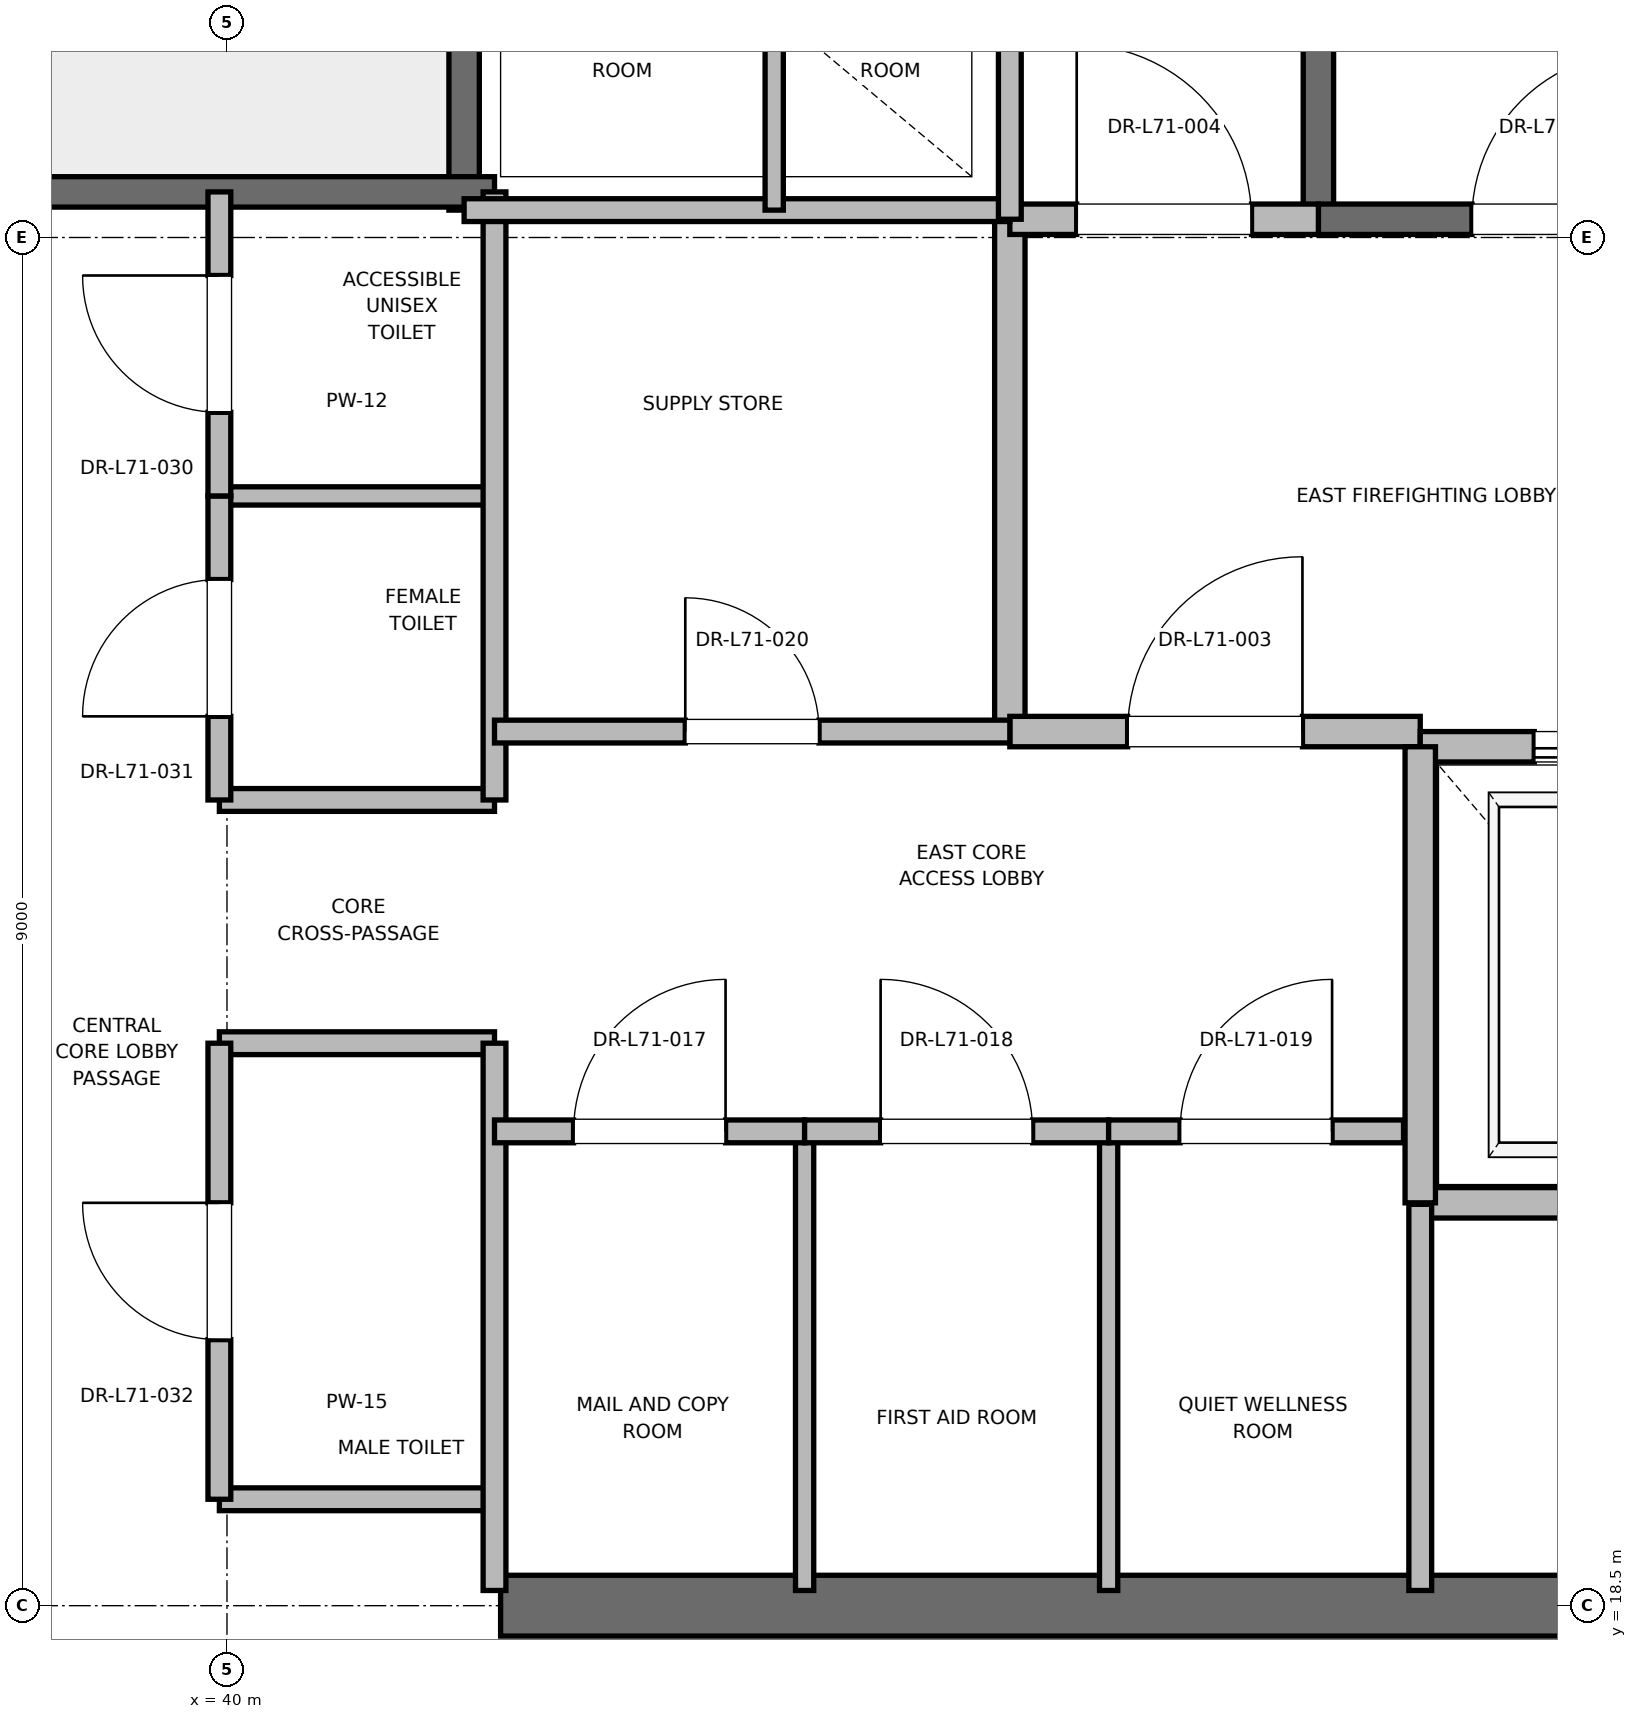
"""IFC4 building model, lengths in metres.
Left out: names, types, materials, properties, quantities, classifications, styles, units other than length and angle.
Written with IfcOpenShell. Run it as: python <this file> out.ifc"""

import sys

from ifc_helpers import new_model, si_unit, direction, frame, frame_2d, origin, place, context, subcontext, project, spatial, rectangle, extrude, element, fill, save


model = new_model("IFC4")
c1 = context("Model", 3, precision=1e-05, world=origin(), true_north=direction((0.0, 1.0)))
c2 = subcontext(c1, "Body", "Model", "MODEL_VIEW")
j1 = project(units=[si_unit("LENGTHUNIT", "METRE"), si_unit("PLANEANGLEUNIT", "RADIAN")], contexts=[c1])
p1 = place(None, origin())
s1 = spatial("IfcSite", under=j1, at=p1, CompositionType="ELEMENT")
p2 = place(p1, origin())
s2 = spatial("IfcBuilding", under=s1, at=p2, CompositionType="ELEMENT")
p3 = place(p2, frame((0.0, 0.0, 306.8)))
s3 = spatial("IfcBuildingStorey", under=s2, at=p3, CompositionType="ELEMENT", Elevation=306.8)
p4 = place(p3, frame((41.8, 18.5, 0.0), z_axis=(0.0, 0.0, 1.0), x_axis=(1.0, 0.0, 0.0)))
e1 = element("IfcWall", 1, at=p4, inside=s3, PredefinedType="SHEAR", context=c2, shape_type="SweptSolid", body=[
    extrude(rectangle(XDim=9.2, YDim=0.4, at=frame_2d((4.6, 0.0))), origin(), (0.0, 0.0, 1.0), 3.785),
])
p5 = place(p3, frame((47.18, 27.62, 0.0), z_axis=(0.0, 0.0, 1.0), x_axis=(0.0, 1.0, 0.0)))
e2 = element("IfcWall", 2, at=p5, inside=s3, PredefinedType="SOLIDWALL", context=c2, shape_type="SweptSolid", body=[
    extrude(rectangle(XDim=8.18, YDim=0.2, at=frame_2d((4.09, 0.0))), origin(), (0.0, 0.0, 1.0), 3.785),
])
p6 = place(p3, frame((47.18, 27.62, 0.0), z_axis=(0.0, 0.0, 1.0), x_axis=(1.0, 0.0, 0.0)))
e3 = element("IfcWall", 3, at=p6, inside=s3, PredefinedType="SOLIDWALL", context=c2, shape_type="SweptSolid", body=[
    extrude(rectangle(XDim=3.12, YDim=0.2, at=frame_2d((1.56, 0.0))), origin(), (0.0, 0.0, 1.0), 3.785),
])
p7 = place(p6, frame((1.01, 0.0, 0.0)))
e4 = element("IfcOpeningElement", 4, at=p7, cuts=e3, PredefinedType="OPENING", context=c2, shape_type="SweptSolid", body=[
    extrude(rectangle(XDim=1.1, YDim=2.15, at=frame_2d((0.55, 1.075))), frame((0.0, 0.1, 0.0), z_axis=(0.0, -1.0, 0.0), x_axis=(1.0, 0.0, 0.0)), (0.0, 0.0, 1.0), 0.2),
])
p8 = place(p3, frame((41.56, 27.68, 0.0), z_axis=(0.0, 0.0, 1.0), x_axis=(0.0, 1.0, 0.0)))
e5 = element("IfcWall", 5, at=p8, inside=s3, PredefinedType="SOLIDWALL", context=c2, shape_type="SweptSolid", body=[
    extrude(rectangle(XDim=8.57, YDim=0.2, at=frame_2d((4.285, 0.0))), origin(), (0.0, 0.0, 1.0), 3.785),
])
p9 = place(p3, frame((38.44, 27.8, 0.0), z_axis=(0.0, 0.0, 1.0), x_axis=(1.0, 0.0, 0.0)))
e6 = element("IfcWall", 6, at=p9, inside=s3, PredefinedType="SOLIDWALL", context=c2, shape_type="SweptSolid", body=[
    extrude(rectangle(XDim=3.32, YDim=0.2, at=frame_2d((1.66, 0.0))), origin(), (0.0, 0.0, 1.0), 3.785),
])
p10 = place(p3, frame((45.15, 24.25, 0.0), z_axis=(0.0, 0.0, 1.0), x_axis=(0.0, 1.0, 0.0)))
e7 = element("IfcWall", 7, at=p10, inside=s3, PredefinedType="PARTITIONING", context=c2, shape_type="SweptSolid", body=[
    extrude(rectangle(XDim=3.37, YDim=0.2, at=frame_2d((1.685, 0.0))), origin(), (0.0, 0.0, 1.0), 3.785),
])
p11 = place(p3, frame((45.15, 24.25, 0.0), z_axis=(0.0, 0.0, 1.0), x_axis=(1.0, 0.0, 0.0)))
e8 = element("IfcWall", 8, at=p11, inside=s3, PredefinedType="PARTITIONING", context=c2, shape_type="SweptSolid", body=[
    extrude(rectangle(XDim=2.7, YDim=0.2, at=frame_2d((1.35, 0.0))), origin(), (0.0, 0.0, 1.0), 3.785),
])
p12 = place(p11, frame((0.775, 0.0, 0.0)))
e9 = element("IfcOpeningElement", 9, at=p12, cuts=e8, PredefinedType="OPENING", context=c2, shape_type="SweptSolid", body=[
    extrude(rectangle(XDim=1.15, YDim=2.2, at=frame_2d((0.575, 1.1))), frame((0.0, 0.1, 0.0), z_axis=(0.0, -1.0, 0.0), x_axis=(1.0, 0.0, 0.0)), (0.0, 0.0, 1.0), 0.2),
])
p13 = place(p3, frame((45.15, 27.62, 0.0), z_axis=(0.0, 0.0, 1.0), x_axis=(1.0, 0.0, 0.0)))
e10 = element("IfcWall", 10, at=p13, inside=s3, PredefinedType="PARTITIONING", context=c2, shape_type="SweptSolid", body=[
    extrude(rectangle(XDim=2.03, YDim=0.2, at=frame_2d((1.015, 0.0))), origin(), (0.0, 0.0, 1.0), 3.785),
])
p14 = place(p13, frame((0.44, 0.0, 0.0)))
e11 = element("IfcOpeningElement", 11, at=p14, cuts=e10, PredefinedType="OPENING", context=c2, shape_type="SweptSolid", body=[
    extrude(rectangle(XDim=1.15, YDim=2.2, at=frame_2d((0.575, 1.1))), frame((0.0, 0.1, 0.0), z_axis=(0.0, -1.0, 0.0), x_axis=(1.0, 0.0, 0.0)), (0.0, 0.0, 1.0), 0.2),
])
p15 = place(p3, frame((47.85, 21.15, 0.0), z_axis=(0.0, 0.0, 1.0), x_axis=(1.0, 0.0, 0.0)))
e12 = element("IfcWall", 12, at=p15, inside=s3, PredefinedType="SOLIDWALL", context=c2, shape_type="SweptSolid", body=[
    extrude(rectangle(XDim=2.6, YDim=0.2, at=frame_2d((1.3, 0.0))), origin(), (0.0, 0.0, 1.0), 3.785),
])
p16 = place(p3, frame((50.45, 24.15, 0.0), z_axis=(0.0, 0.0, 1.0), x_axis=(-1.0, 0.0, 0.0)))
e13 = element("IfcWall", 13, at=p16, inside=s3, PredefinedType="SOLIDWALL", context=c2, shape_type="SweptSolid", body=[
    extrude(rectangle(XDim=2.6, YDim=0.2, at=frame_2d((1.3, 0.0))), origin(), (0.0, 0.0, 1.0), 2.865),
])
p17 = place(p16, frame((0.75, 0.0, 0.0)))
e14 = element("IfcOpeningElement", 14, at=p17, cuts=e13, PredefinedType="OPENING", context=c2, shape_type="SweptSolid", body=[
    extrude(rectangle(XDim=1.1, YDim=2.2, at=frame_2d((0.55, 1.1))), frame((0.0, 0.1, 0.0), z_axis=(0.0, -1.0, 0.0), x_axis=(1.0, 0.0, 0.0)), (0.0, 0.0, 1.0), 0.2),
])
p18 = place(p3, frame((47.85, 24.15, 0.0), z_axis=(0.0, 0.0, 1.0), x_axis=(0.0, -1.0, 0.0)))
e15 = element("IfcWall", 15, at=p18, inside=s3, PredefinedType="SOLIDWALL", context=c2, shape_type="SweptSolid", body=[
    extrude(rectangle(XDim=3.0, YDim=0.2, at=frame_2d((1.5, 0.0))), origin(), (0.0, 0.0, 1.0), 3.785),
])
for number, where, z_axis, x_axis in (
    (16, (39.95, 19.2, 0.0), (0.0, 0.0, 1.0), (1.0, 0.0, 0.0)),
    (17, (39.95, 22.2, 0.0), (0.0, 0.0, 1.0), (1.0, 0.0, 0.0)),
    (18, (39.95, 23.8, 0.0), (0.0, 0.0, 1.0), (1.0, 0.0, 0.0)),
):
    element("IfcWall", number, at=place(p3, frame(where, z_axis=z_axis, x_axis=x_axis)), inside=s3, PredefinedType="PARTITIONING", context=c2, shape_type="SweptSolid", body=[
        extrude(rectangle(XDim=1.81, YDim=0.15, at=frame_2d((0.905, 0.0))), origin(), (0.0, 0.0, 1.0), 2.85),
    ])
p19 = place(p3, frame((39.95, 25.8, 0.0), z_axis=(0.0, 0.0, 1.0), x_axis=(1.0, 0.0, 0.0)))
e19 = element("IfcWall", 19, at=p19, inside=s3, PredefinedType="PARTITIONING", context=c2, shape_type="SweptSolid", body=[
    extrude(rectangle(XDim=1.81, YDim=0.12, at=frame_2d((0.905, 0.0))), origin(), (0.0, 0.0, 1.0), 2.85),
])
p20 = place(p3, frame((41.76, 18.6, 0.0), z_axis=(0.0, 0.0, 1.0), x_axis=(0.0, 1.0, 0.0)))
e20 = element("IfcWall", 20, at=p20, inside=s3, PredefinedType="PARTITIONING", context=c2, shape_type="SweptSolid", body=[
    extrude(rectangle(XDim=3.6, YDim=0.15, at=frame_2d((1.8, 0.0))), origin(), (0.0, 0.0, 1.0), 2.85),
])
p21 = place(p3, frame((41.76, 23.8, 0.0), z_axis=(0.0, 0.0, 1.0), x_axis=(0.0, 1.0, 0.0)))
e21 = element("IfcWall", 21, at=p21, inside=s3, PredefinedType="PARTITIONING", context=c2, shape_type="SweptSolid", body=[
    extrude(rectangle(XDim=4.0, YDim=0.15, at=frame_2d((2.0, 0.0))), origin(), (0.0, 0.0, 1.0), 2.85),
])
p22 = place(p3, frame((39.95, 19.2, 0.0), z_axis=(0.0, 0.0, 1.0), x_axis=(0.0, 1.0, 0.0)))
e22 = element("IfcWall", 22, at=p22, inside=s3, PredefinedType="PARTITIONING", context=c2, shape_type="SweptSolid", body=[
    extrude(rectangle(XDim=3.0, YDim=0.15, at=frame_2d((1.5, 0.0))), origin(), (0.0, 0.0, 1.0), 2.85),
])
p23 = place(p22, frame((1.05, 0.0, 0.0)))
e23 = element("IfcOpeningElement", 23, at=p23, cuts=e22, PredefinedType="OPENING", context=c2, shape_type="SweptSolid", body=[
    extrude(rectangle(XDim=0.9, YDim=2.1, at=frame_2d((0.45, 1.05))), frame((0.0, 0.075, 0.0), z_axis=(0.0, -1.0, 0.0), x_axis=(1.0, 0.0, 0.0)), (0.0, 0.0, 1.0), 0.15),
])
p24 = place(p3, frame((39.95, 23.8, 0.0), z_axis=(0.0, 0.0, 1.0), x_axis=(0.0, 1.0, 0.0)))
e24 = element("IfcWall", 24, at=p24, inside=s3, PredefinedType="PARTITIONING", context=c2, shape_type="SweptSolid", body=[
    extrude(rectangle(XDim=2.0, YDim=0.15, at=frame_2d((1.0, 0.0))), origin(), (0.0, 0.0, 1.0), 2.85),
])
p25 = place(p24, frame((0.55, 0.0, 0.0)))
e25 = element("IfcOpeningElement", 25, at=p25, cuts=e24, PredefinedType="OPENING", context=c2, shape_type="SweptSolid", body=[
    extrude(rectangle(XDim=0.9, YDim=2.1, at=frame_2d((0.45, 1.05))), frame((0.0, 0.075, 0.0), z_axis=(0.0, -1.0, 0.0), x_axis=(1.0, 0.0, 0.0)), (0.0, 0.0, 1.0), 0.15),
])
p26 = place(p3, frame((39.95, 25.8, 0.0), z_axis=(0.0, 0.0, 1.0), x_axis=(0.0, 1.0, 0.0)))
e26 = element("IfcWall", 26, at=p26, inside=s3, PredefinedType="PARTITIONING", context=c2, shape_type="SweptSolid", body=[
    extrude(rectangle(XDim=2.0, YDim=0.15, at=frame_2d((1.0, 0.0))), origin(), (0.0, 0.0, 1.0), 2.85),
])
p27 = place(p26, frame((0.55, 0.0, 0.0)))
e27 = element("IfcOpeningElement", 27, at=p27, cuts=e26, PredefinedType="OPENING", context=c2, shape_type="SweptSolid", body=[
    extrude(rectangle(XDim=0.9, YDim=2.1, at=frame_2d((0.45, 1.05))), frame((0.0, 0.075, 0.0), z_axis=(0.0, -1.0, 0.0), x_axis=(1.0, 0.0, 0.0)), (0.0, 0.0, 1.0), 0.15),
])
p28 = place(p3, frame((41.56, 27.68, 0.0), z_axis=(0.0, 0.0, 1.0), x_axis=(1.0, 0.0, 0.0)))
e28 = element("IfcWall", 28, at=p28, inside=s3, PredefinedType="PARTITIONING", context=c2, shape_type="SweptSolid", body=[
    extrude(rectangle(XDim=3.59, YDim=0.15, at=frame_2d((1.795, 0.0))), origin(), (0.0, 0.0, 1.0), 2.85),
])
p29 = place(p3, frame((47.85, 18.6, 0.0), z_axis=(0.0, 0.0, 1.0), x_axis=(0.0, 1.0, 0.0)))
e29 = element("IfcWall", 29, at=p29, inside=s3, PredefinedType="PARTITIONING", context=c2, shape_type="SweptSolid", body=[
    extrude(rectangle(XDim=2.54, YDim=0.15, at=frame_2d((1.27, 0.0))), origin(), (0.0, 0.0, 1.0), 2.85),
])
for number, where, z_axis, x_axis in (
    (30, (43.8, 18.6, 0.0), (0.0, 0.0, 1.0), (0.0, 1.0, 0.0)),
    (31, (45.8, 18.6, 0.0), (0.0, 0.0, 1.0), (0.0, 1.0, 0.0)),
):
    element("IfcWall", number, at=place(p3, frame(where, z_axis=z_axis, x_axis=x_axis)), inside=s3, PredefinedType="PARTITIONING", context=c2, shape_type="SweptSolid", body=[
        extrude(rectangle(XDim=3.02, YDim=0.12, at=frame_2d((1.51, 0.0))), origin(), (0.0, 0.0, 1.0), 2.85),
    ])
p30 = place(p3, frame((41.76, 21.62, 0.0), z_axis=(0.0, 0.0, 1.0), x_axis=(1.0, 0.0, 0.0)))
e32 = element("IfcWall", 32, at=p30, inside=s3, PredefinedType="PARTITIONING", context=c2, shape_type="SweptSolid", body=[
    extrude(rectangle(XDim=2.04, YDim=0.15, at=frame_2d((1.02, 0.0))), origin(), (0.0, 0.0, 1.0), 2.85),
])
p31 = place(p30, frame((0.52, 0.0, 0.0)))
e33 = element("IfcOpeningElement", 33, at=p31, cuts=e32, PredefinedType="OPENING", context=c2, shape_type="SweptSolid", body=[
    extrude(rectangle(XDim=1.0, YDim=2.15, at=frame_2d((0.5, 1.075))), frame((0.0, 0.075, 0.0), z_axis=(0.0, -1.0, 0.0), x_axis=(1.0, 0.0, 0.0)), (0.0, 0.0, 1.0), 0.15),
])
p32 = place(p3, frame((43.8, 21.62, 0.0), z_axis=(0.0, 0.0, 1.0), x_axis=(1.0, 0.0, 0.0)))
e34 = element("IfcWall", 34, at=p32, inside=s3, PredefinedType="PARTITIONING", context=c2, shape_type="SweptSolid", body=[
    extrude(rectangle(XDim=2.0, YDim=0.15, at=frame_2d((1.0, 0.0))), origin(), (0.0, 0.0, 1.0), 2.85),
])
p33 = place(p32, frame((0.5, 0.0, 0.0)))
e35 = element("IfcOpeningElement", 35, at=p33, cuts=e34, PredefinedType="OPENING", context=c2, shape_type="SweptSolid", body=[
    extrude(rectangle(XDim=1.0, YDim=2.15, at=frame_2d((0.5, 1.075))), frame((0.0, 0.075, 0.0), z_axis=(0.0, -1.0, 0.0), x_axis=(1.0, 0.0, 0.0)), (0.0, 0.0, 1.0), 0.15),
])
p34 = place(p3, frame((45.8, 21.62, 0.0), z_axis=(0.0, 0.0, 1.0), x_axis=(1.0, 0.0, 0.0)))
e36 = element("IfcWall", 36, at=p34, inside=s3, PredefinedType="PARTITIONING", context=c2, shape_type="SweptSolid", body=[
    extrude(rectangle(XDim=1.94, YDim=0.15, at=frame_2d((0.97, 0.0))), origin(), (0.0, 0.0, 1.0), 2.85),
])
p35 = place(p34, frame((0.47, 0.0, 0.0)))
e37 = element("IfcOpeningElement", 37, at=p35, cuts=e36, PredefinedType="OPENING", context=c2, shape_type="SweptSolid", body=[
    extrude(rectangle(XDim=1.0, YDim=2.15, at=frame_2d((0.5, 1.075))), frame((0.0, 0.075, 0.0), z_axis=(0.0, -1.0, 0.0), x_axis=(1.0, 0.0, 0.0)), (0.0, 0.0, 1.0), 0.15),
])
p36 = place(p3, frame((41.76, 24.25, 0.0), z_axis=(0.0, 0.0, 1.0), x_axis=(1.0, 0.0, 0.0)))
e38 = element("IfcWall", 38, at=p36, inside=s3, PredefinedType="PARTITIONING", context=c2, shape_type="SweptSolid", body=[
    extrude(rectangle(XDim=3.39, YDim=0.15, at=frame_2d((1.695, 0.0))), origin(), (0.0, 0.0, 1.0), 2.85),
])
p37 = place(p36, frame((1.255, 0.0, 0.0)))
e39 = element("IfcOpeningElement", 39, at=p37, cuts=e38, PredefinedType="OPENING", context=c2, shape_type="SweptSolid", body=[
    extrude(rectangle(XDim=0.88, YDim=2.1, at=frame_2d((0.44, 1.05))), frame((0.0, 0.075, 0.0), z_axis=(0.0, -1.0, 0.0), x_axis=(1.0, 0.0, 0.0)), (0.0, 0.0, 1.0), 0.15),
])
p38 = place(p3, frame((45.15, 27.62, 0.0), z_axis=(0.0, 0.0, 1.0), x_axis=(0.0, 1.0, 0.0)))
e40 = element("IfcWall", 40, at=p38, inside=s3, PredefinedType="PARTITIONING", context=c2, shape_type="SweptSolid", body=[
    extrude(rectangle(XDim=3.1, YDim=0.15, at=frame_2d((1.55, 0.0))), origin(), (0.0, 0.0, 1.0), 2.85),
])
p39 = place(p3, frame((43.6, 27.68, 0.0), z_axis=(0.0, 0.0, 1.0), x_axis=(0.0, 1.0, 0.0)))
e41 = element("IfcWall", 41, at=p39, inside=s3, PredefinedType="PARTITIONING", context=c2, shape_type="SweptSolid", body=[
    extrude(rectangle(XDim=3.04, YDim=0.12, at=frame_2d((1.52, 0.0))), origin(), (0.0, 0.0, 1.0), 2.85),
])
p40 = place(p7, origin())
e42 = element("IfcDoor", 42, at=p40, inside=s3, OperationType="SINGLE_SWING_RIGHT", PredefinedType="DOOR", context=c2, shape_type="SweptSolid", body=[
    extrude(rectangle(XDim=1.1, YDim=2.15, at=frame_2d((0.55, 1.075))), frame((0.0, 0.025, 0.0), z_axis=(0.0, -1.0, 0.0), x_axis=(1.0, 0.0, 0.0)), (0.0, 0.0, 1.0), 0.05),
])
fill(e4, e42)
p41 = place(p12, origin())
e43 = element("IfcDoor", 43, at=p41, inside=s3, OperationType="SINGLE_SWING_RIGHT", PredefinedType="DOOR", context=c2, shape_type="SweptSolid", body=[
    extrude(rectangle(XDim=1.15, YDim=2.2, at=frame_2d((0.575, 1.1))), frame((0.0, 0.025, 0.0), z_axis=(0.0, -1.0, 0.0), x_axis=(1.0, 0.0, 0.0)), (0.0, 0.0, 1.0), 0.05),
])
fill(e9, e43)
p42 = place(p14, origin())
e44 = element("IfcDoor", 44, at=p42, inside=s3, OperationType="SINGLE_SWING_LEFT", PredefinedType="DOOR", context=c2, shape_type="SweptSolid", body=[
    extrude(rectangle(XDim=1.15, YDim=2.2, at=frame_2d((0.575, 1.1))), frame((0.0, 0.025, 0.0), z_axis=(0.0, -1.0, 0.0), x_axis=(1.0, 0.0, 0.0)), (0.0, 0.0, 1.0), 0.05),
])
fill(e11, e44)
p43 = place(p17, origin())
e45 = element("IfcDoor", 45, at=p43, inside=s3, OperationType="SLIDING_TO_RIGHT", PredefinedType="DOOR", context=c2, shape_type="SweptSolid", body=[
    extrude(rectangle(XDim=1.1, YDim=2.2, at=frame_2d((0.55, 1.1))), frame((0.0, 0.025, 0.0), z_axis=(0.0, -1.0, 0.0), x_axis=(1.0, 0.0, 0.0)), (0.0, 0.0, 1.0), 0.05),
])
fill(e14, e45)
p44 = place(p23, origin())
e46 = element("IfcDoor", 46, at=p44, inside=s3, OperationType="SINGLE_SWING_RIGHT", PredefinedType="DOOR", context=c2, shape_type="SweptSolid", body=[
    extrude(rectangle(XDim=0.9, YDim=2.1, at=frame_2d((0.45, 1.05))), frame((0.0, 0.025, 0.0), z_axis=(0.0, -1.0, 0.0), x_axis=(1.0, 0.0, 0.0)), (0.0, 0.0, 1.0), 0.05),
])
fill(e23, e46)
p45 = place(p25, origin())
e47 = element("IfcDoor", 47, at=p45, inside=s3, OperationType="SINGLE_SWING_LEFT", PredefinedType="DOOR", context=c2, shape_type="SweptSolid", body=[
    extrude(rectangle(XDim=0.9, YDim=2.1, at=frame_2d((0.45, 1.05))), frame((0.0, 0.025, 0.0), z_axis=(0.0, -1.0, 0.0), x_axis=(1.0, 0.0, 0.0)), (0.0, 0.0, 1.0), 0.05),
])
fill(e25, e47)
p46 = place(p27, origin())
e48 = element("IfcDoor", 48, at=p46, inside=s3, OperationType="SINGLE_SWING_RIGHT", PredefinedType="DOOR", context=c2, shape_type="SweptSolid", body=[
    extrude(rectangle(XDim=0.9, YDim=2.1, at=frame_2d((0.45, 1.05))), frame((0.0, 0.025, 0.0), z_axis=(0.0, -1.0, 0.0), x_axis=(1.0, 0.0, 0.0)), (0.0, 0.0, 1.0), 0.05),
])
fill(e27, e48)
p47 = place(p31, origin())
e49 = element("IfcDoor", 49, at=p47, inside=s3, OperationType="SINGLE_SWING_RIGHT", PredefinedType="DOOR", context=c2, shape_type="SweptSolid", body=[
    extrude(rectangle(XDim=1.0, YDim=2.15, at=frame_2d((0.5, 1.075))), frame((0.0, 0.025, 0.0), z_axis=(0.0, -1.0, 0.0), x_axis=(1.0, 0.0, 0.0)), (0.0, 0.0, 1.0), 0.05),
])
fill(e33, e49)
p48 = place(p33, origin())
e50 = element("IfcDoor", 50, at=p48, inside=s3, OperationType="SINGLE_SWING_LEFT", PredefinedType="DOOR", context=c2, shape_type="SweptSolid", body=[
    extrude(rectangle(XDim=1.0, YDim=2.15, at=frame_2d((0.5, 1.075))), frame((0.0, 0.025, 0.0), z_axis=(0.0, -1.0, 0.0), x_axis=(1.0, 0.0, 0.0)), (0.0, 0.0, 1.0), 0.05),
])
fill(e35, e50)
p49 = place(p35, origin())
e51 = element("IfcDoor", 51, at=p49, inside=s3, OperationType="SINGLE_SWING_RIGHT", PredefinedType="DOOR", context=c2, shape_type="SweptSolid", body=[
    extrude(rectangle(XDim=1.0, YDim=2.15, at=frame_2d((0.5, 1.075))), frame((0.0, 0.025, 0.0), z_axis=(0.0, -1.0, 0.0), x_axis=(1.0, 0.0, 0.0)), (0.0, 0.0, 1.0), 0.05),
])
fill(e37, e51)
p50 = place(p37, origin())
e52 = element("IfcDoor", 52, at=p50, inside=s3, OperationType="SINGLE_SWING_LEFT", PredefinedType="DOOR", context=c2, shape_type="SweptSolid", body=[
    extrude(rectangle(XDim=0.88, YDim=2.1, at=frame_2d((0.44, 1.05))), frame((0.0, 0.025, 0.0), z_axis=(0.0, -1.0, 0.0), x_axis=(1.0, 0.0, 0.0)), (0.0, 0.0, 1.0), 0.05),
])
fill(e39, e52)
save(model, sys.argv[1])
